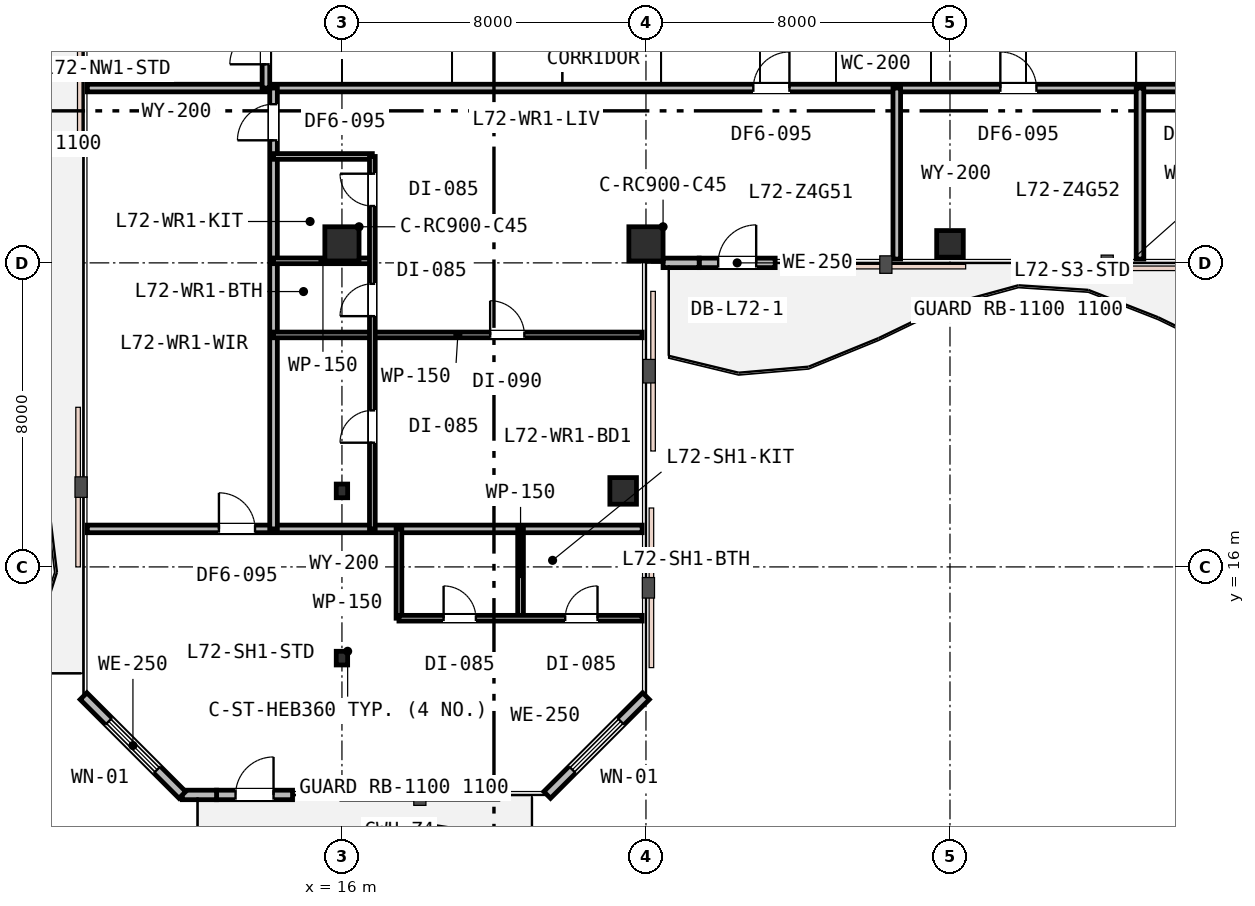
"""IFC4 building model, lengths in metres.
Left out: names, types, materials, properties, quantities, classifications, styles, units other than length and angle.
Written with IfcOpenShell. Run it as: python <this file> out.ifc"""

import sys

from ifc_helpers import new_model, si_unit, direction, frame, frame_2d, origin, origin_2d, place, context, subcontext, project, spatial, rectangle, i_section, extrude, element, fill, save


model = new_model("IFC4")
c1 = context("Model", 3, precision=1e-05, world=origin(), true_north=direction((0.0, 1.0)))
c2 = subcontext(c1, "Body", "Model", "MODEL_VIEW")
j1 = project(units=[si_unit("LENGTHUNIT", "METRE"), si_unit("PLANEANGLEUNIT", "RADIAN")], contexts=[c1])
p1 = place(None, origin())
s1 = spatial("IfcSite", under=j1, at=p1, CompositionType="ELEMENT")
p2 = place(p1, origin())
s2 = spatial("IfcBuilding", under=s1, at=p2, CompositionType="ELEMENT")
p3 = place(p2, frame((0.0, 0.0, 279.2)))
s3 = spatial("IfcBuildingStorey", under=s2, at=p3, CompositionType="ELEMENT", Elevation=279.2)
for number, where, z_axis, x_axis in (
    (1, (16.0, 24.5, 0.0), (0.0, 0.0, 1.0), (1.0, 0.0, 0.0)),
    (2, (24.0, 24.5, 0.0), (0.0, 0.0, 1.0), (1.0, 0.0, 0.0)),
):
    element("IfcColumn", number, at=place(p3, frame(where, z_axis=z_axis, x_axis=x_axis)), inside=s3, PredefinedType="COLUMN", context=c2, shape_type="SweptSolid", body=[
        extrude(rectangle(XDim=0.9, YDim=0.9, at=origin_2d()), origin(), (0.0, 0.0, 1.0), 3.8),
    ])
for number, where, z_axis, x_axis in (
    (3, (32.0, 24.5, 0.0), (0.0, 0.0, 1.0), (1.0, 0.0, 0.0)),
    (4, (23.4, 18.0, 0.0), (0.0, 0.0, 1.0), (1.0, 0.0, 0.0)),
):
    element("IfcColumn", number, at=place(p3, frame(where, z_axis=z_axis, x_axis=x_axis)), inside=s3, PredefinedType="COLUMN", context=c2, shape_type="SweptSolid", body=[
        extrude(rectangle(XDim=0.7, YDim=0.7, at=origin_2d()), origin(), (0.0, 0.0, 1.0), 3.8),
    ])
for number, where, z_axis, x_axis in (
    (5, (16.0, 13.6, 0.0), (0.0, 0.0, 1.0), (1.0, 0.0, 0.0)),
    (6, (16.0, 18.0, 0.0), (0.0, 0.0, 1.0), (1.0, 0.0, 0.0)),
):
    element("IfcColumn", number, at=place(p3, frame(where, z_axis=z_axis, x_axis=x_axis)), inside=s3, PredefinedType="COLUMN", context=c2, shape_type="SweptSolid", body=[
        extrude(i_section(OverallWidth=0.3, OverallDepth=0.36, WebThickness=0.013, FlangeThickness=0.022, FilletRadius=0.027, at=origin_2d()), origin(), (0.0, 0.0, 1.0), 3.8),
    ])
p4 = place(p3, frame((12.7, 10.0, 0.0), z_axis=(0.0, 0.0, 1.0), x_axis=(1.0, 0.0, 0.0)))
e7 = element("IfcWall", 7, at=p4, inside=s3, PredefinedType="STANDARD", context=c2, shape_type="SweptSolid", body=[
    extrude(rectangle(XDim=2.0, YDim=0.25, at=frame_2d((1.0, 0.0))), origin(), (0.0, 0.0, 1.0), 3.53),
])
p5 = place(p4, frame((0.5, 0.0, 0.0)))
e8 = element("IfcOpeningElement", 8, at=p5, cuts=e7, PredefinedType="OPENING", context=c2, shape_type="SweptSolid", body=[
    extrude(rectangle(XDim=1.0, YDim=2.15, at=frame_2d((0.5, 1.075))), frame((0.0, 0.135, 0.0), z_axis=(0.0, -1.0, 0.0), x_axis=(1.0, 0.0, 0.0)), (0.0, 0.0, 1.0), 0.27),
])
p6 = place(p3, frame((11.8, 10.0, 0.0), z_axis=(0.0, 0.0, 1.0), x_axis=(1.0, 0.0, 0.0)))
e9 = element("IfcWall", 9, at=p6, inside=s3, PredefinedType="STANDARD", context=c2, shape_type="SweptSolid", body=[
    extrude(rectangle(XDim=0.9, YDim=0.25, at=frame_2d((0.45, 0.0))), origin(), (0.0, 0.0, 1.0), 3.53),
])
p7 = place(p3, frame((21.4, 10.0, 0.0), z_axis=(0.0, 0.0, 1.0), x_axis=(0.707106781187, 0.707106781187, 0.0)))
e10 = element("IfcWall", 10, at=p7, inside=s3, PredefinedType="STANDARD", context=c2, shape_type="SweptSolid", body=[
    extrude(rectangle(XDim=3.677, YDim=0.25, at=frame_2d((1.839, 0.0))), origin(), (0.0, 0.0, 1.0), 3.53),
])
p8 = place(p7, frame((0.939, 0.0, 0.75)))
e11 = element("IfcOpeningElement", 11, at=p8, cuts=e10, PredefinedType="OPENING", context=c2, shape_type="SweptSolid", body=[
    extrude(rectangle(XDim=1.8, YDim=1.85, at=frame_2d((0.9, 0.925))), frame((0.0, 0.135, 0.0), z_axis=(0.0, -1.0, 0.0), x_axis=(1.0, 0.0, 0.0)), (0.0, 0.0, 1.0), 0.27),
])
p9 = place(p3, frame((25.4, 24.0, 0.0), z_axis=(0.0, 0.0, 1.0), x_axis=(1.0, 0.0, 0.0)))
e12 = element("IfcWall", 12, at=p9, inside=s3, PredefinedType="STANDARD", context=c2, shape_type="SweptSolid", body=[
    extrude(rectangle(XDim=2.0, YDim=0.25, at=frame_2d((1.0, 0.0))), origin(), (0.0, 0.0, 1.0), 3.27),
])
p10 = place(p9, frame((0.5, 0.0, 0.0)))
e13 = element("IfcOpeningElement", 13, at=p10, cuts=e12, PredefinedType="OPENING", context=c2, shape_type="SweptSolid", body=[
    extrude(rectangle(XDim=1.0, YDim=2.15, at=frame_2d((0.5, 1.075))), frame((0.0, 0.135, 0.0), z_axis=(0.0, -1.0, 0.0), x_axis=(1.0, 0.0, 0.0)), (0.0, 0.0, 1.0), 0.27),
])
p11 = place(p3, frame((24.45, 24.0, 0.0), z_axis=(0.0, 0.0, 1.0), x_axis=(1.0, 0.0, 0.0)))
e14 = element("IfcWall", 14, at=p11, inside=s3, PredefinedType="STANDARD", context=c2, shape_type="SweptSolid", body=[
    extrude(rectangle(XDim=0.95, YDim=0.25, at=frame_2d((0.475, 0.0))), origin(), (0.0, 0.0, 1.0), 3.27),
])
p12 = place(p3, frame((9.2, 12.6, 0.0), z_axis=(0.0, 0.0, 1.0), x_axis=(0.707106781187, -0.707106781187, 0.0)))
e15 = element("IfcWall", 15, at=p12, inside=s3, PredefinedType="STANDARD", context=c2, shape_type="SweptSolid", body=[
    extrude(rectangle(XDim=3.677, YDim=0.25, at=frame_2d((1.839, 0.0))), origin(), (0.0, 0.0, 1.0), 3.53),
])
p13 = place(p12, frame((0.939, 0.0, 0.75)))
e16 = element("IfcOpeningElement", 16, at=p13, cuts=e15, PredefinedType="OPENING", context=c2, shape_type="SweptSolid", body=[
    extrude(rectangle(XDim=1.8, YDim=1.85, at=frame_2d((0.9, 0.925))), frame((0.0, 0.135, 0.0), z_axis=(0.0, -1.0, 0.0), x_axis=(1.0, 0.0, 0.0)), (0.0, 0.0, 1.0), 0.27),
])
p14 = place(p3, frame((9.3, 28.6, 0.0), z_axis=(0.0, 0.0, 1.0), x_axis=(1.0, 0.0, 0.0)))
e17 = element("IfcWall", 17, at=p14, inside=s3, PredefinedType="PARTITIONING", context=c2, shape_type="SweptSolid", body=[
    extrude(rectangle(XDim=4.7, YDim=0.2, at=frame_2d((2.35, 0.0))), origin(), (0.0, 0.0, 1.0), 3.53),
])
p15 = place(p3, frame((14.2, 28.6, 0.0), z_axis=(0.0, 0.0, 1.0), x_axis=(1.0, 0.0, 0.0)))
e18 = element("IfcWall", 18, at=p15, inside=s3, PredefinedType="PARTITIONING", context=c2, shape_type="SweptSolid", body=[
    extrude(rectangle(XDim=31.7, YDim=0.2, at=frame_2d((15.85, 0.0))), origin(), (0.0, 0.0, 1.0), 3.16),
])
p16 = place(p15, frame((12.625, 0.0, 0.0)))
e19 = element("IfcOpeningElement", 19, at=p16, cuts=e18, PredefinedType="OPENING", context=c2, shape_type="SweptSolid", body=[
    extrude(rectangle(XDim=0.95, YDim=2.15, at=frame_2d((0.475, 1.075))), frame((0.0, 0.11, 0.0), z_axis=(0.0, -1.0, 0.0), x_axis=(1.0, 0.0, 0.0)), (0.0, 0.0, 1.0), 0.22),
])
p17 = place(p15, frame((19.125, 0.0, 0.0)))
e20 = element("IfcOpeningElement", 20, at=p17, cuts=e18, PredefinedType="OPENING", context=c2, shape_type="SweptSolid", body=[
    extrude(rectangle(XDim=0.95, YDim=2.15, at=frame_2d((0.475, 1.075))), frame((0.0, 0.11, 0.0), z_axis=(0.0, -1.0, 0.0), x_axis=(1.0, 0.0, 0.0)), (0.0, 0.0, 1.0), 0.22),
])
p18 = place(p15, frame((24.016, 0.0, 0.0)))
e21 = element("IfcOpeningElement", 21, at=p18, cuts=e18, PredefinedType="OPENING", context=c2, shape_type="SweptSolid", body=[
    extrude(rectangle(XDim=0.95, YDim=2.15, at=frame_2d((0.475, 1.075))), frame((0.0, 0.11, 0.0), z_axis=(0.0, -1.0, 0.0), x_axis=(1.0, 0.0, 0.0)), (0.0, 0.0, 1.0), 0.22),
])
p19 = place(p3, frame((14.0, 28.6, 0.0), z_axis=(0.0, 0.0, 1.0), x_axis=(0.0, 1.0, 0.0)))
e22 = element("IfcWall", 22, at=p19, inside=s3, PredefinedType="PARTITIONING", context=c2, shape_type="SweptSolid", body=[
    extrude(rectangle(XDim=14.3, YDim=0.2, at=frame_2d((7.15, 0.0))), origin(), (0.0, 0.0, 1.0), 3.53),
])
p20 = place(p19, frame((0.625, 0.0, 0.0)))
e23 = element("IfcOpeningElement", 23, at=p20, cuts=e22, PredefinedType="OPENING", context=c2, shape_type="SweptSolid", body=[
    extrude(rectangle(XDim=0.95, YDim=2.15, at=frame_2d((0.475, 1.075))), frame((0.0, 0.11, 0.0), z_axis=(0.0, -1.0, 0.0), x_axis=(1.0, 0.0, 0.0)), (0.0, 0.0, 1.0), 0.22),
])
for number, where, z_axis, x_axis in (
    (24, (30.6, 24.1, 0.0), (0.0, 0.0, 1.0), (0.0, 1.0, 0.0)),
    (25, (37.0, 24.1, 0.0), (0.0, 0.0, 1.0), (0.0, 1.0, 0.0)),
):
    element("IfcWall", number, at=place(p3, frame(where, z_axis=z_axis, x_axis=x_axis)), inside=s3, PredefinedType="PARTITIONING", context=c2, shape_type="SweptSolid", body=[
        extrude(rectangle(XDim=4.5, YDim=0.2, at=frame_2d((2.25, 0.0))), origin(), (0.0, 0.0, 1.0), 3.27),
    ])
p21 = place(p3, frame((9.3, 17.0, 0.0), z_axis=(0.0, 0.0, 1.0), x_axis=(1.0, 0.0, 0.0)))
e26 = element("IfcWall", 26, at=p21, inside=s3, PredefinedType="PARTITIONING", context=c2, shape_type="SweptSolid", body=[
    extrude(rectangle(XDim=14.6, YDim=0.2, at=frame_2d((7.3, 0.0))), origin(), (0.0, 0.0, 1.0), 3.16),
])
p22 = place(p21, frame((3.463, 0.0, 0.0)))
e27 = element("IfcOpeningElement", 27, at=p22, cuts=e26, PredefinedType="OPENING", context=c2, shape_type="SweptSolid", body=[
    extrude(rectangle(XDim=0.95, YDim=2.15, at=frame_2d((0.475, 1.075))), frame((0.0, 0.11, 0.0), z_axis=(0.0, -1.0, 0.0), x_axis=(1.0, 0.0, 0.0)), (0.0, 0.0, 1.0), 0.22),
])
p23 = place(p3, frame((14.2, 17.0, 0.0), z_axis=(0.0, 0.0, 1.0), x_axis=(0.0, 1.0, 0.0)))
e28 = element("IfcWall", 28, at=p23, inside=s3, PredefinedType="PARTITIONING", context=c2, shape_type="SweptSolid", body=[
    extrude(rectangle(XDim=11.6, YDim=0.2, at=frame_2d((5.8, 0.0))), origin(), (0.0, 0.0, 1.0), 3.53),
])
p24 = place(p23, frame((10.225, 0.0, 0.0)))
e29 = element("IfcOpeningElement", 29, at=p24, cuts=e28, PredefinedType="OPENING", context=c2, shape_type="SweptSolid", body=[
    extrude(rectangle(XDim=0.95, YDim=2.15, at=frame_2d((0.475, 1.075))), frame((0.0, 0.11, 0.0), z_axis=(0.0, -1.0, 0.0), x_axis=(1.0, 0.0, 0.0)), (0.0, 0.0, 1.0), 0.22),
])
p25 = place(p3, frame((14.2, 22.104, 0.0), z_axis=(0.0, 0.0, 1.0), x_axis=(1.0, 0.0, 0.0)))
e30 = element("IfcWall", 30, at=p25, inside=s3, PredefinedType="PARTITIONING", context=c2, shape_type="SweptSolid", body=[
    extrude(rectangle(XDim=9.7, YDim=0.15, at=frame_2d((4.85, 0.0))), origin(), (0.0, 0.0, 1.0), 3.16),
])
p26 = place(p25, frame((5.7, 0.0, 0.0)))
e31 = element("IfcOpeningElement", 31, at=p26, cuts=e30, PredefinedType="OPENING", context=c2, shape_type="SweptSolid", body=[
    extrude(rectangle(XDim=0.9, YDim=2.15, at=frame_2d((0.45, 1.075))), frame((0.0, 0.085, 0.0), z_axis=(0.0, -1.0, 0.0), x_axis=(1.0, 0.0, 0.0)), (0.0, 0.0, 1.0), 0.17),
])
for number, where, z_axis, x_axis in (
    (32, (14.2, 24.054, 0.0), (0.0, 0.0, 1.0), (1.0, 0.0, 0.0)),
    (33, (14.2, 26.8, 0.0), (0.0, 0.0, 1.0), (1.0, 0.0, 0.0)),
):
    element("IfcWall", number, at=place(p3, frame(where, z_axis=z_axis, x_axis=x_axis)), inside=s3, PredefinedType="PARTITIONING", context=c2, shape_type="SweptSolid", body=[
        extrude(rectangle(XDim=2.6, YDim=0.15, at=frame_2d((1.3, 0.0))), origin(), (0.0, 0.0, 1.0), 3.16),
    ])
p27 = place(p3, frame((16.8, 17.0, 0.0), z_axis=(0.0, 0.0, 1.0), x_axis=(0.0, 1.0, 0.0)))
e34 = element("IfcWall", 34, at=p27, inside=s3, PredefinedType="PARTITIONING", context=c2, shape_type="SweptSolid", body=[
    extrude(rectangle(XDim=9.8, YDim=0.15, at=frame_2d((4.9, 0.0))), origin(), (0.0, 0.0, 1.0), 3.16),
])
p28 = place(p27, frame((5.598, 0.0, 0.0)))
e35 = element("IfcOpeningElement", 35, at=p28, cuts=e34, PredefinedType="OPENING", context=c2, shape_type="SweptSolid", body=[
    extrude(rectangle(XDim=0.85, YDim=2.15, at=frame_2d((0.425, 1.075))), frame((0.0, 0.085, 0.0), z_axis=(0.0, -1.0, 0.0), x_axis=(1.0, 0.0, 0.0)), (0.0, 0.0, 1.0), 0.17),
])
p29 = place(p27, frame((8.496, 0.0, 0.0)))
e36 = element("IfcOpeningElement", 36, at=p29, cuts=e34, PredefinedType="OPENING", context=c2, shape_type="SweptSolid", body=[
    extrude(rectangle(XDim=0.85, YDim=2.15, at=frame_2d((0.425, 1.075))), frame((0.0, 0.085, 0.0), z_axis=(0.0, -1.0, 0.0), x_axis=(1.0, 0.0, 0.0)), (0.0, 0.0, 1.0), 0.17),
])
p30 = place(p27, frame((2.268, 0.0, 0.0)))
e37 = element("IfcOpeningElement", 37, at=p30, cuts=e34, PredefinedType="OPENING", context=c2, shape_type="SweptSolid", body=[
    extrude(rectangle(XDim=0.85, YDim=2.15, at=frame_2d((0.425, 1.075))), frame((0.0, 0.085, 0.0), z_axis=(0.0, -1.0, 0.0), x_axis=(1.0, 0.0, 0.0)), (0.0, 0.0, 1.0), 0.17),
])
for number, where, z_axis, x_axis in (
    (38, (17.5, 14.65, 0.0), (0.0, 0.0, 1.0), (0.0, 1.0, 0.0)),
    (39, (20.7, 14.65, 0.0), (0.0, 0.0, 1.0), (0.0, 1.0, 0.0)),
):
    element("IfcWall", number, at=place(p3, frame(where, z_axis=z_axis, x_axis=x_axis)), inside=s3, PredefinedType="PARTITIONING", context=c2, shape_type="SweptSolid", body=[
        extrude(rectangle(XDim=2.35, YDim=0.15, at=frame_2d((1.175, 0.0))), origin(), (0.0, 0.0, 1.0), 3.53),
    ])
p31 = place(p3, frame((17.5, 14.65, 0.0), z_axis=(0.0, 0.0, 1.0), x_axis=(1.0, 0.0, 0.0)))
e40 = element("IfcWall", 40, at=p31, inside=s3, PredefinedType="PARTITIONING", context=c2, shape_type="SweptSolid", body=[
    extrude(rectangle(XDim=6.4, YDim=0.15, at=frame_2d((3.2, 0.0))), origin(), (0.0, 0.0, 1.0), 3.53),
])
p32 = place(p31, frame((1.175, 0.0, 0.0)))
e41 = element("IfcOpeningElement", 41, at=p32, cuts=e40, PredefinedType="OPENING", context=c2, shape_type="SweptSolid", body=[
    extrude(rectangle(XDim=0.85, YDim=2.15, at=frame_2d((0.425, 1.075))), frame((0.0, 0.085, 0.0), z_axis=(0.0, -1.0, 0.0), x_axis=(1.0, 0.0, 0.0)), (0.0, 0.0, 1.0), 0.17),
])
p33 = place(p31, frame((4.375, 0.0, 0.0)))
e42 = element("IfcOpeningElement", 42, at=p33, cuts=e40, PredefinedType="OPENING", context=c2, shape_type="SweptSolid", body=[
    extrude(rectangle(XDim=0.85, YDim=2.15, at=frame_2d((0.425, 1.075))), frame((0.0, 0.085, 0.0), z_axis=(0.0, -1.0, 0.0), x_axis=(1.0, 0.0, 0.0)), (0.0, 0.0, 1.0), 0.17),
])
p34 = place(p5, origin())
e43 = element("IfcDoor", 43, at=p34, inside=s3, OperationType="SINGLE_SWING_RIGHT", PredefinedType="DOOR", context=c2, shape_type="SweptSolid", body=[
    extrude(rectangle(XDim=1.0, YDim=2.15, at=frame_2d((0.5, 1.075))), frame((0.0, 0.025, 0.0), z_axis=(0.0, -1.0, 0.0), x_axis=(1.0, 0.0, 0.0)), (0.0, 0.0, 1.0), 0.05),
])
fill(e8, e43)
p35 = place(p8, origin())
e44 = element("IfcWindow", 44, at=p35, inside=s3, PartitioningType="SINGLE_PANEL", PredefinedType="WINDOW", context=c2, shape_type="SweptSolid", body=[
    extrude(rectangle(XDim=1.8, YDim=1.85, at=frame_2d((0.9, 0.925))), frame((0.0, 0.03, 0.0), z_axis=(0.0, -1.0, 0.0), x_axis=(1.0, 0.0, 0.0)), (0.0, 0.0, 1.0), 0.06),
])
fill(e11, e44)
p36 = place(p10, origin())
e45 = element("IfcDoor", 45, at=p36, inside=s3, OperationType="SINGLE_SWING_RIGHT", PredefinedType="DOOR", context=c2, shape_type="SweptSolid", body=[
    extrude(rectangle(XDim=1.0, YDim=2.15, at=frame_2d((0.5, 1.075))), frame((0.0, 0.025, 0.0), z_axis=(0.0, -1.0, 0.0), x_axis=(1.0, 0.0, 0.0)), (0.0, 0.0, 1.0), 0.05),
])
fill(e13, e45)
p37 = place(p13, origin())
e46 = element("IfcWindow", 46, at=p37, inside=s3, PartitioningType="SINGLE_PANEL", PredefinedType="WINDOW", context=c2, shape_type="SweptSolid", body=[
    extrude(rectangle(XDim=1.8, YDim=1.85, at=frame_2d((0.9, 0.925))), frame((0.0, 0.03, 0.0), z_axis=(0.0, -1.0, 0.0), x_axis=(1.0, 0.0, 0.0)), (0.0, 0.0, 1.0), 0.06),
])
fill(e16, e46)
p38 = place(p20, origin())
e47 = element("IfcDoor", 47, at=p38, inside=s3, OperationType="SINGLE_SWING_LEFT", PredefinedType="DOOR", context=c2, shape_type="SweptSolid", body=[
    extrude(rectangle(XDim=0.95, YDim=2.15, at=frame_2d((0.475, 1.075))), frame((0.0, 0.025, 0.0), z_axis=(0.0, -1.0, 0.0), x_axis=(1.0, 0.0, 0.0)), (0.0, 0.0, 1.0), 0.05),
])
fill(e23, e47)
p39 = place(p16, origin())
e48 = element("IfcDoor", 48, at=p39, inside=s3, OperationType="SINGLE_SWING_RIGHT", PredefinedType="DOOR", context=c2, shape_type="SweptSolid", body=[
    extrude(rectangle(XDim=0.95, YDim=2.15, at=frame_2d((0.475, 1.075))), frame((0.0, 0.025, 0.0), z_axis=(0.0, -1.0, 0.0), x_axis=(1.0, 0.0, 0.0)), (0.0, 0.0, 1.0), 0.05),
])
fill(e19, e48)
p40 = place(p17, origin())
e49 = element("IfcDoor", 49, at=p40, inside=s3, OperationType="SINGLE_SWING_LEFT", PredefinedType="DOOR", context=c2, shape_type="SweptSolid", body=[
    extrude(rectangle(XDim=0.95, YDim=2.15, at=frame_2d((0.475, 1.075))), frame((0.0, 0.025, 0.0), z_axis=(0.0, -1.0, 0.0), x_axis=(1.0, 0.0, 0.0)), (0.0, 0.0, 1.0), 0.05),
])
fill(e20, e49)
p41 = place(p24, origin())
e50 = element("IfcDoor", 50, at=p41, inside=s3, OperationType="SINGLE_SWING_LEFT", PredefinedType="DOOR", context=c2, shape_type="SweptSolid", body=[
    extrude(rectangle(XDim=0.95, YDim=2.15, at=frame_2d((0.475, 1.075))), frame((0.0, 0.025, 0.0), z_axis=(0.0, -1.0, 0.0), x_axis=(1.0, 0.0, 0.0)), (0.0, 0.0, 1.0), 0.05),
])
fill(e29, e50)
p42 = place(p28, origin())
e51 = element("IfcDoor", 51, at=p42, inside=s3, OperationType="SINGLE_SWING_LEFT", PredefinedType="DOOR", context=c2, shape_type="SweptSolid", body=[
    extrude(rectangle(XDim=0.85, YDim=2.15, at=frame_2d((0.425, 1.075))), frame((0.0, 0.025, 0.0), z_axis=(0.0, -1.0, 0.0), x_axis=(1.0, 0.0, 0.0)), (0.0, 0.0, 1.0), 0.05),
])
fill(e35, e51)
p43 = place(p29, origin())
e52 = element("IfcDoor", 52, at=p43, inside=s3, OperationType="SINGLE_SWING_RIGHT", PredefinedType="DOOR", context=c2, shape_type="SweptSolid", body=[
    extrude(rectangle(XDim=0.85, YDim=2.15, at=frame_2d((0.425, 1.075))), frame((0.0, 0.025, 0.0), z_axis=(0.0, -1.0, 0.0), x_axis=(1.0, 0.0, 0.0)), (0.0, 0.0, 1.0), 0.05),
])
fill(e36, e52)
p44 = place(p30, origin())
e53 = element("IfcDoor", 53, at=p44, inside=s3, OperationType="SINGLE_SWING_LEFT", PredefinedType="DOOR", context=c2, shape_type="SweptSolid", body=[
    extrude(rectangle(XDim=0.85, YDim=2.15, at=frame_2d((0.425, 1.075))), frame((0.0, 0.025, 0.0), z_axis=(0.0, -1.0, 0.0), x_axis=(1.0, 0.0, 0.0)), (0.0, 0.0, 1.0), 0.05),
])
fill(e37, e53)
p45 = place(p26, origin())
e54 = element("IfcDoor", 54, at=p45, inside=s3, OperationType="SINGLE_SWING_LEFT", PredefinedType="DOOR", context=c2, shape_type="SweptSolid", body=[
    extrude(rectangle(XDim=0.9, YDim=2.15, at=frame_2d((0.45, 1.075))), frame((0.0, 0.025, 0.0), z_axis=(0.0, -1.0, 0.0), x_axis=(1.0, 0.0, 0.0)), (0.0, 0.0, 1.0), 0.05),
])
fill(e31, e54)
p46 = place(p22, origin())
e55 = element("IfcDoor", 55, at=p46, inside=s3, OperationType="SINGLE_SWING_LEFT", PredefinedType="DOOR", context=c2, shape_type="SweptSolid", body=[
    extrude(rectangle(XDim=0.95, YDim=2.15, at=frame_2d((0.475, 1.075))), frame((0.0, 0.025, 0.0), z_axis=(0.0, -1.0, 0.0), x_axis=(1.0, 0.0, 0.0)), (0.0, 0.0, 1.0), 0.05),
])
fill(e27, e55)
p47 = place(p32, origin())
e56 = element("IfcDoor", 56, at=p47, inside=s3, OperationType="SINGLE_SWING_LEFT", PredefinedType="DOOR", context=c2, shape_type="SweptSolid", body=[
    extrude(rectangle(XDim=0.85, YDim=2.15, at=frame_2d((0.425, 1.075))), frame((0.0, 0.025, 0.0), z_axis=(0.0, -1.0, 0.0), x_axis=(1.0, 0.0, 0.0)), (0.0, 0.0, 1.0), 0.05),
])
fill(e41, e56)
p48 = place(p33, origin())
e57 = element("IfcDoor", 57, at=p48, inside=s3, OperationType="SINGLE_SWING_RIGHT", PredefinedType="DOOR", context=c2, shape_type="SweptSolid", body=[
    extrude(rectangle(XDim=0.85, YDim=2.15, at=frame_2d((0.425, 1.075))), frame((0.0, 0.025, 0.0), z_axis=(0.0, -1.0, 0.0), x_axis=(1.0, 0.0, 0.0)), (0.0, 0.0, 1.0), 0.05),
])
fill(e42, e57)
save(model, sys.argv[1])
